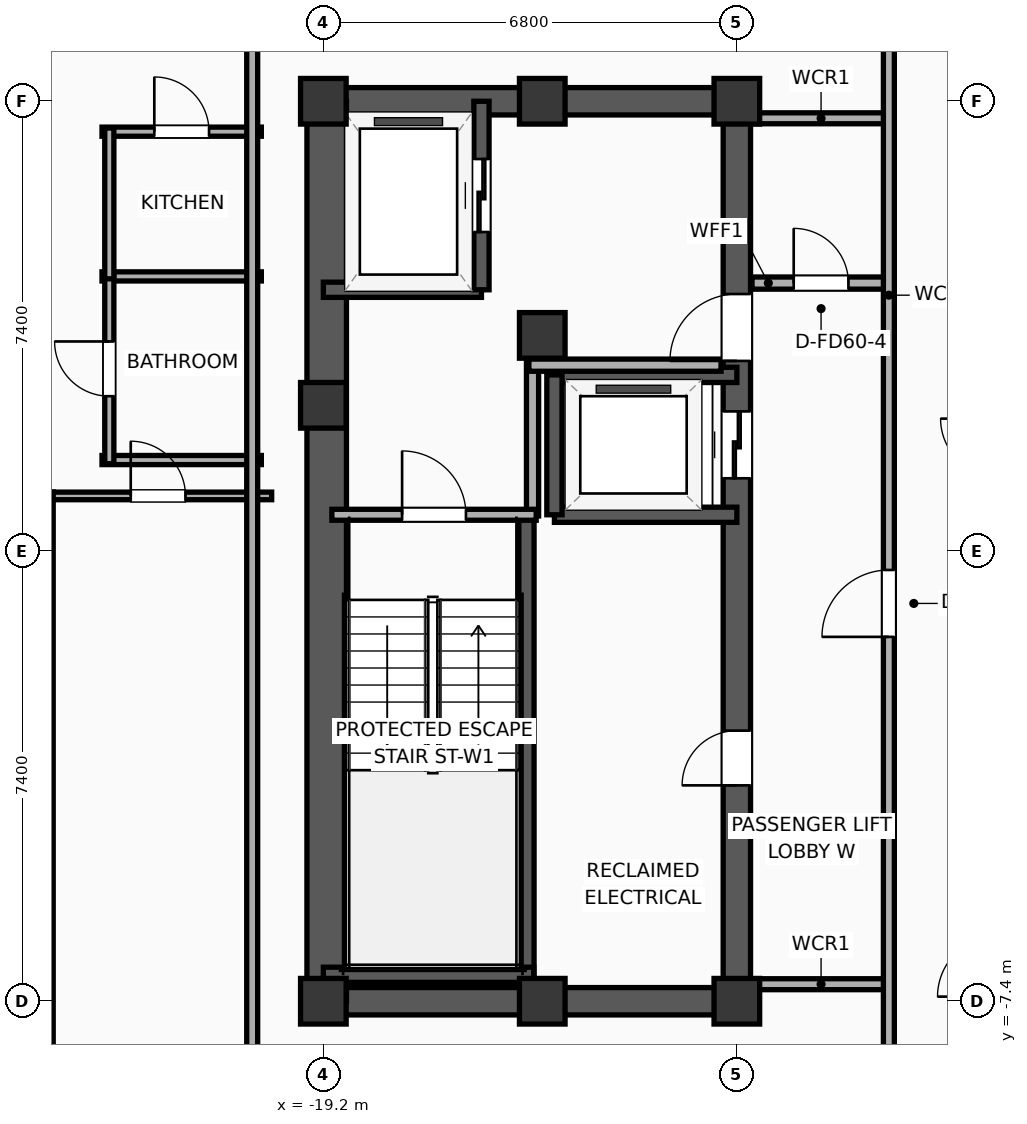
"""IFC4 building model, lengths in metres.
Left out: names, types, materials, properties, quantities, classifications, styles, units other than length and angle.
Written with IfcOpenShell. Run it as: python <this file> out.ifc"""

import sys

from ifc_helpers import new_model, si_unit, direction, frame, frame_2d, origin, origin_2d, place, context, subcontext, project, spatial, rectangle, extrude, element, fill, save


model = new_model("IFC4")
c1 = context("Model", 3, precision=1e-05, world=origin(), true_north=direction((0.0, 1.0)))
c2 = subcontext(c1, "Body", "Model", "MODEL_VIEW")
j1 = project(units=[si_unit("LENGTHUNIT", "METRE"), si_unit("PLANEANGLEUNIT", "RADIAN")], contexts=[c1])
p1 = place(None, origin())
s1 = spatial("IfcSite", under=j1, at=p1, CompositionType="ELEMENT")
p2 = place(p1, origin())
s2 = spatial("IfcBuilding", under=s1, at=p2, CompositionType="ELEMENT")
p3 = place(p2, frame((0.0, 0.0, 260.0)))
s3 = spatial("IfcBuildingStorey", under=s2, at=p3, CompositionType="ELEMENT", Elevation=260.0)
for number, where, z_axis, x_axis in (
    (1, (-19.2, -7.4, 0.0), (0.0, 0.0, 1.0), (1.0, 0.0, 0.0)),
    (2, (-19.2, 2.4, 0.0), (0.0, 0.0, 1.0), (1.0, 0.0, 0.0)),
    (3, (-19.2, 7.4, 0.0), (0.0, 0.0, 1.0), (1.0, 0.0, 0.0)),
    (4, (-15.6, -7.4, 0.0), (0.0, 0.0, 1.0), (1.0, 0.0, 0.0)),
    (5, (-15.6, 7.4, 0.0), (0.0, 0.0, 1.0), (1.0, 0.0, 0.0)),
    (6, (-12.4, -7.4, 0.0), (0.0, 0.0, 1.0), (1.0, 0.0, 0.0)),
    (7, (-15.6, 3.55, 0.0), (0.0, 0.0, 1.0), (1.0, 0.0, 0.0)),
    (8, (-12.4, 7.4, 0.0), (0.0, 0.0, 1.0), (1.0, 0.0, 0.0)),
):
    element("IfcColumn", number, at=place(p3, frame(where, z_axis=z_axis, x_axis=x_axis)), inside=s3, PredefinedType="COLUMN", context=c2, shape_type="SweptSolid", body=[
        extrude(rectangle(XDim=0.75, YDim=0.75, at=origin_2d()), origin(), (0.0, 0.0, 1.0), 3.9),
    ])
for number, where, z_axis, x_axis in (
    (9, (-19.425, -7.4, 0.0), (0.0, 0.0, 1.0), (1.0, 0.0, 0.0)),
    (10, (-19.425, 7.4, 0.0), (0.0, 0.0, 1.0), (1.0, 0.0, 0.0)),
):
    element("IfcWall", number, at=place(p3, frame(where, z_axis=z_axis, x_axis=x_axis)), inside=s3, PredefinedType="SHEAR", context=c2, shape_type="SweptSolid", body=[
        extrude(rectangle(XDim=7.25, YDim=0.45, at=frame_2d((3.625, 0.0))), origin(), (0.0, 0.0, 1.0), 3.65),
    ])
p4 = place(p3, frame((-19.145, -7.4, 0.0), z_axis=(0.0, 0.0, 1.0), x_axis=(0.0, 1.0, 0.0)))
e11 = element("IfcWall", 11, at=p4, inside=s3, PredefinedType="SHEAR", context=c2, shape_type="SweptSolid", body=[
    extrude(rectangle(XDim=14.8, YDim=0.65, at=frame_2d((7.4, 0.0))), origin(), (0.0, 0.0, 1.0), 3.65),
])
p5 = place(p3, frame((-12.4, -7.4, 0.0), z_axis=(0.0, 0.0, 1.0), x_axis=(0.0, 1.0, 0.0)))
e12 = element("IfcWall", 12, at=p5, inside=s3, PredefinedType="SHEAR", context=c2, shape_type="SweptSolid", body=[
    extrude(rectangle(XDim=14.8, YDim=0.45, at=frame_2d((7.4, 0.0))), origin(), (0.0, 0.0, 1.0), 3.65),
])
p6 = place(p5, frame((8.6, 0.0, 0.0)))
e13 = element("IfcOpeningElement", 13, at=p6, cuts=e12, PredefinedType="OPENING", context=c2, shape_type="SweptSolid", body=[
    extrude(rectangle(XDim=1.1, YDim=2.05, at=frame_2d((0.55, 1.025))), frame((0.0, 0.235, 0.0), z_axis=(0.0, -1.0, 0.0), x_axis=(1.0, 0.0, 0.0)), (0.0, 0.0, 1.0), 0.47),
])
p7 = place(p5, frame((10.53, 0.0, 0.0)))
e14 = element("IfcOpeningElement", 14, at=p7, cuts=e12, PredefinedType="OPENING", context=c2, shape_type="SweptSolid", body=[
    extrude(rectangle(XDim=1.1, YDim=2.05, at=frame_2d((0.55, 1.025))), frame((0.0, 0.235, 0.0), z_axis=(0.0, -1.0, 0.0), x_axis=(1.0, 0.0, 0.0)), (0.0, 0.0, 1.0), 0.47),
])
p8 = place(p5, frame((3.55, 0.0, 0.0)))
e15 = element("IfcOpeningElement", 15, at=p8, cuts=e12, PredefinedType="OPENING", context=c2, shape_type="SweptSolid", body=[
    extrude(rectangle(XDim=0.9, YDim=2.05, at=frame_2d((0.45, 1.025))), frame((0.0, 0.235, 0.0), z_axis=(0.0, -1.0, 0.0), x_axis=(1.0, 0.0, 0.0)), (0.0, 0.0, 1.0), 0.47),
])
p9 = place(p3, frame((-15.86, -7.085, 0.0), z_axis=(0.0, 0.0, 1.0), x_axis=(0.0, 1.0, 0.0)))
e16 = element("IfcWall", 16, at=p9, inside=s3, PredefinedType="SOLIDWALL", context=c2, shape_type="SweptSolid", body=[
    extrude(rectangle(XDim=7.685, YDim=0.25, at=frame_2d((3.843, 0.0))), origin(), (0.0, 0.0, 1.0), 3.65),
])
p10 = place(p3, frame((-19.2, -6.965, 0.0), z_axis=(0.0, 0.0, 1.0), x_axis=(1.0, 0.0, 0.0)))
e17 = element("IfcWall", 17, at=p10, inside=s3, PredefinedType="SOLIDWALL", context=c2, shape_type="SweptSolid", body=[
    extrude(rectangle(XDim=3.46, YDim=0.25, at=frame_2d((1.73, 0.0))), origin(), (0.0, 0.0, 1.0), 3.65),
])
p11 = place(p3, frame((-19.2, 4.3, 0.0), z_axis=(0.0, 0.0, 1.0), x_axis=(1.0, 0.0, 0.0)))
e18 = element("IfcWall", 18, at=p11, inside=s3, PredefinedType="SOLIDWALL", context=c2, shape_type="SweptSolid", body=[
    extrude(rectangle(XDim=2.6, YDim=0.25, at=frame_2d((1.3, 0.0))), origin(), (0.0, 0.0, 1.0), 3.65),
])
p12 = place(p3, frame((-16.6, 4.3, 0.0), z_axis=(0.0, 0.0, 1.0), x_axis=(0.0, 1.0, 0.0)))
e19 = element("IfcWall", 19, at=p12, inside=s3, PredefinedType="SOLIDWALL", context=c2, shape_type="SweptSolid", body=[
    extrude(rectangle(XDim=3.1, YDim=0.25, at=frame_2d((1.55, 0.0))), origin(), (0.0, 0.0, 1.0), 3.65),
])
p13 = place(p12, frame((0.95, 0.0, 0.0)))
e20 = element("IfcOpeningElement", 20, at=p13, cuts=e19, PredefinedType="OPENING", context=c2, shape_type="SweptSolid", body=[
    extrude(rectangle(XDim=1.2, YDim=2.05, at=frame_2d((0.6, 1.025))), frame((0.0, 0.135, 0.0), z_axis=(0.0, -1.0, 0.0), x_axis=(1.0, 0.0, 0.0)), (0.0, 0.0, 1.0), 0.27),
])
for number, where, z_axis, x_axis in (
    (21, (-15.4, 0.6, 0.0), (0.0, 0.0, 1.0), (1.0, 0.0, 0.0)),
    (22, (-12.4, 2.9, 0.0), (0.0, 0.0, 1.0), (-1.0, 0.0, 0.0)),
):
    element("IfcWall", number, at=place(p3, frame(where, z_axis=z_axis, x_axis=x_axis)), inside=s3, PredefinedType="SOLIDWALL", context=c2, shape_type="SweptSolid", body=[
        extrude(rectangle(XDim=3.0, YDim=0.25, at=frame_2d((1.5, 0.0))), origin(), (0.0, 0.0, 1.0), 3.65),
    ])
p14 = place(p3, frame((-15.4, 2.9, 0.0), z_axis=(0.0, 0.0, 1.0), x_axis=(0.0, -1.0, 0.0)))
e23 = element("IfcWall", 23, at=p14, inside=s3, PredefinedType="SOLIDWALL", context=c2, shape_type="SweptSolid", body=[
    extrude(rectangle(XDim=2.3, YDim=0.25, at=frame_2d((1.15, 0.0))), origin(), (0.0, 0.0, 1.0), 3.65),
])
p15 = place(p3, frame((-15.76, 0.58, 0.0), z_axis=(0.0, 0.0, 1.0), x_axis=(0.0, 1.0, 0.0)))
e24 = element("IfcWall", 24, at=p15, inside=s3, PredefinedType="PARTITIONING", context=c2, shape_type="SweptSolid", body=[
    extrude(rectangle(XDim=2.52, YDim=0.2, at=frame_2d((1.26, 0.0))), origin(), (0.0, 0.0, 1.0), 3.65),
])
p16 = place(p3, frame((-15.82, 3.06, 0.0), z_axis=(0.0, 0.0, 1.0), x_axis=(1.0, 0.0, 0.0)))
e25 = element("IfcWall", 25, at=p16, inside=s3, PredefinedType="PARTITIONING", context=c2, shape_type="SweptSolid", body=[
    extrude(rectangle(XDim=3.16, YDim=0.2, at=frame_2d((1.58, 0.0))), origin(), (0.0, 0.0, 1.0), 3.65),
])
p17 = place(p3, frame((-19.06, 0.6, 0.0), z_axis=(0.0, 0.0, 1.0), x_axis=(1.0, 0.0, 0.0)))
e26 = element("IfcWall", 26, at=p17, inside=s3, PredefinedType="PARTITIONING", context=c2, shape_type="SweptSolid", body=[
    extrude(rectangle(XDim=3.36, YDim=0.18, at=frame_2d((1.68, 0.0))), origin(), (0.0, 0.0, 1.0), 3.65),
])
p18 = place(p17, frame((1.155, 0.0, 0.0)))
e27 = element("IfcOpeningElement", 27, at=p18, cuts=e26, PredefinedType="OPENING", context=c2, shape_type="SweptSolid", body=[
    extrude(rectangle(XDim=1.05, YDim=2.05, at=frame_2d((0.525, 1.025))), frame((0.0, 0.1, 0.0), z_axis=(0.0, -1.0, 0.0), x_axis=(1.0, 0.0, 0.0)), (0.0, 0.0, 1.0), 0.2),
])
p19 = place(p3, frame((-12.15, 4.41, 0.0), z_axis=(0.0, 0.0, 1.0), x_axis=(1.0, 0.0, 0.0)))
e28 = element("IfcWall", 28, at=p19, inside=s3, PredefinedType="PARTITIONING", context=c2, shape_type="SweptSolid", body=[
    extrude(rectangle(XDim=2.27, YDim=0.2, at=frame_2d((1.135, 0.0))), origin(), (0.0, 0.0, 1.0), 3.65),
])
p20 = place(p19, frame((0.685, 0.0, 0.0)))
e29 = element("IfcOpeningElement", 29, at=p20, cuts=e28, PredefinedType="OPENING", context=c2, shape_type="SweptSolid", body=[
    extrude(rectangle(XDim=0.9, YDim=2.05, at=frame_2d((0.45, 1.025))), frame((0.0, 0.11, 0.0), z_axis=(0.0, -1.0, 0.0), x_axis=(1.0, 0.0, 0.0)), (0.0, 0.0, 1.0), 0.22),
])
for number, where, z_axis, x_axis in (
    (30, (-12.15, 7.12, 0.0), (0.0, 0.0, 1.0), (1.0, 0.0, 0.0)),
    (31, (-12.15, -7.12, 0.0), (0.0, 0.0, 1.0), (1.0, 0.0, 0.0)),
):
    element("IfcWall", number, at=place(p3, frame(where, z_axis=z_axis, x_axis=x_axis)), inside=s3, PredefinedType="PARTITIONING", context=c2, shape_type="SweptSolid", body=[
        extrude(rectangle(XDim=2.27, YDim=0.18, at=frame_2d((1.135, 0.0))), origin(), (0.0, 0.0, 1.0), 3.65),
    ])
p21 = place(p3, frame((-9.9, -8.58, 0.0), z_axis=(0.0, 0.0, 1.0), x_axis=(0.0, 1.0, 0.0)))
e32 = element("IfcWall", 32, at=p21, inside=s3, PredefinedType="PARTITIONING", context=c2, shape_type="SweptSolid", body=[
    extrude(rectangle(XDim=17.16, YDim=0.18, at=frame_2d((8.58, 0.0))), origin(), (0.0, 0.0, 1.0), 3.65),
])
p22 = place(p21, frame((7.172, 0.0, 0.0)))
e33 = element("IfcOpeningElement", 33, at=p22, cuts=e32, PredefinedType="OPENING", context=c2, shape_type="SweptSolid", body=[
    extrude(rectangle(XDim=1.1, YDim=2.05, at=frame_2d((0.55, 1.025))), frame((0.0, 0.1, 0.0), z_axis=(0.0, -1.0, 0.0), x_axis=(1.0, 0.0, 0.0)), (0.0, 0.0, 1.0), 0.2),
])
p23 = place(p3, frame((-22.84, 6.9, 0.0), z_axis=(0.0, 0.0, 1.0), x_axis=(1.0, 0.0, 0.0)))
e34 = element("IfcWall", 34, at=p23, inside=s3, PredefinedType="PLUMBINGWALL", context=c2, shape_type="SweptSolid", body=[
    extrude(rectangle(XDim=2.62, YDim=0.15, at=frame_2d((1.31, 0.0))), origin(), (0.0, 0.0, 1.0), 3.65),
])
p24 = place(p23, frame((0.86, 0.0, 0.0)))
e35 = element("IfcOpeningElement", 35, at=p24, cuts=e34, PredefinedType="OPENING", context=c2, shape_type="SweptSolid", body=[
    extrude(rectangle(XDim=0.9, YDim=2.05, at=frame_2d((0.45, 1.025))), frame((0.0, 0.085, 0.0), z_axis=(0.0, -1.0, 0.0), x_axis=(1.0, 0.0, 0.0)), (0.0, 0.0, 1.0), 0.17),
])
for number, where, z_axis, x_axis in (
    (36, (-22.84, 4.52, 0.0), (0.0, 0.0, 1.0), (1.0, 0.0, 0.0)),
    (37, (-22.84, 1.5, 0.0), (0.0, 0.0, 1.0), (1.0, 0.0, 0.0)),
):
    element("IfcWall", number, at=place(p3, frame(where, z_axis=z_axis, x_axis=x_axis)), inside=s3, PredefinedType="PLUMBINGWALL", context=c2, shape_type="SweptSolid", body=[
        extrude(rectangle(XDim=2.62, YDim=0.15, at=frame_2d((1.31, 0.0))), origin(), (0.0, 0.0, 1.0), 3.65),
    ])
p25 = place(p3, frame((-22.72, 1.44, 0.0), z_axis=(0.0, 0.0, 1.0), x_axis=(0.0, 1.0, 0.0)))
e38 = element("IfcWall", 38, at=p25, inside=s3, PredefinedType="PLUMBINGWALL", context=c2, shape_type="SweptSolid", body=[
    extrude(rectangle(XDim=3.12, YDim=0.15, at=frame_2d((1.56, 0.0))), origin(), (0.0, 0.0, 1.0), 3.65),
])
p26 = place(p25, frame((1.11, 0.0, 0.0)))
e39 = element("IfcOpeningElement", 39, at=p26, cuts=e38, PredefinedType="OPENING", context=c2, shape_type="SweptSolid", body=[
    extrude(rectangle(XDim=0.9, YDim=2.05, at=frame_2d((0.45, 1.025))), frame((0.0, 0.085, 0.0), z_axis=(0.0, -1.0, 0.0), x_axis=(1.0, 0.0, 0.0)), (0.0, 0.0, 1.0), 0.17),
])
p27 = place(p3, frame((-22.72, 4.48, 0.0), z_axis=(0.0, 0.0, 1.0), x_axis=(0.0, 1.0, 0.0)))
e40 = element("IfcWall", 40, at=p27, inside=s3, PredefinedType="PLUMBINGWALL", context=c2, shape_type="SweptSolid", body=[
    extrude(rectangle(XDim=2.48, YDim=0.15, at=frame_2d((1.24, 0.0))), origin(), (0.0, 0.0, 1.0), 3.65),
])
p28 = place(p3, frame((-27.104, 0.91, 0.0), z_axis=(0.0, 0.0, 1.0), x_axis=(1.0, 0.0, 0.0)))
e41 = element("IfcWall", 41, at=p28, inside=s3, PredefinedType="PARTITIONING", context=c2, shape_type="SweptSolid", body=[
    extrude(rectangle(XDim=3.461, YDim=0.125, at=frame_2d((1.73, 0.0))), origin(), (0.0, 0.0, 1.0), 3.65),
])
p29 = place(p28, frame((1.281, 0.0, 0.0)))
e42 = element("IfcOpeningElement", 42, at=p29, cuts=e41, PredefinedType="OPENING", context=c2, shape_type="SweptSolid", body=[
    extrude(rectangle(XDim=0.9, YDim=2.05, at=frame_2d((0.45, 1.025))), frame((0.0, 0.073, 0.0), z_axis=(0.0, -1.0, 0.0), x_axis=(1.0, 0.0, 0.0)), (0.0, 0.0, 1.0), 0.145),
])
p30 = place(p3, frame((-23.768, 0.91, 0.0), z_axis=(0.0, 0.0, 1.0), x_axis=(1.0, 0.0, 0.0)))
e43 = element("IfcWall", 43, at=p30, inside=s3, PredefinedType="PARTITIONING", context=c2, shape_type="SweptSolid", body=[
    extrude(rectangle(XDim=3.718, YDim=0.125, at=frame_2d((1.859, 0.0))), origin(), (0.0, 0.0, 1.0), 3.65),
])
p31 = place(p30, frame((1.4, 0.0, 0.0)))
e44 = element("IfcOpeningElement", 44, at=p31, cuts=e43, PredefinedType="OPENING", context=c2, shape_type="SweptSolid", body=[
    extrude(rectangle(XDim=0.9, YDim=2.05, at=frame_2d((0.45, 1.025))), frame((0.0, 0.073, 0.0), z_axis=(0.0, -1.0, 0.0), x_axis=(1.0, 0.0, 0.0)), (0.0, 0.0, 1.0), 0.145),
])
p32 = place(p3, frame((-23.705, -8.81, 0.0), z_axis=(0.0, 0.0, 1.0), x_axis=(0.0, 1.0, 0.0)))
e45 = element("IfcWall", 45, at=p32, inside=s3, PredefinedType="PARTITIONING", context=c2, shape_type="SweptSolid", body=[
    extrude(rectangle(XDim=9.78, YDim=0.125, at=frame_2d((4.89, 0.0))), origin(), (0.0, 0.0, 1.0), 3.65),
])
p33 = place(p3, frame((-20.37, -8.61, 0.0), z_axis=(0.0, 0.0, 1.0), x_axis=(0.0, 1.0, 0.0)))
e46 = element("IfcWall", 46, at=p33, inside=s3, PredefinedType="PARTITIONING", context=c2, shape_type="SweptSolid", body=[
    extrude(rectangle(XDim=17.22, YDim=0.18, at=frame_2d((8.61, 0.0))), origin(), (0.0, 0.0, 1.0), 3.65),
])
p34 = place(p13, origin())
e47 = element("IfcDoor", 47, at=p34, inside=s3, OperationType="SLIDING_TO_LEFT", PredefinedType="DOOR", context=c2, shape_type="SweptSolid", body=[
    extrude(rectangle(XDim=1.2, YDim=2.05, at=frame_2d((0.6, 1.025))), frame((0.0, 0.025, 0.0), z_axis=(0.0, -1.0, 0.0), x_axis=(1.0, 0.0, 0.0)), (0.0, 0.0, 1.0), 0.05),
])
fill(e20, e47)
p35 = place(p6, origin())
e48 = element("IfcDoor", 48, at=p35, inside=s3, OperationType="SLIDING_TO_LEFT", PredefinedType="DOOR", context=c2, shape_type="SweptSolid", body=[
    extrude(rectangle(XDim=1.1, YDim=2.05, at=frame_2d((0.55, 1.025))), frame((0.0, 0.025, 0.0), z_axis=(0.0, -1.0, 0.0), x_axis=(1.0, 0.0, 0.0)), (0.0, 0.0, 1.0), 0.05),
])
fill(e13, e48)
p36 = place(p18, origin())
e49 = element("IfcDoor", 49, at=p36, inside=s3, OperationType="SINGLE_SWING_LEFT", PredefinedType="DOOR", context=c2, shape_type="SweptSolid", body=[
    extrude(rectangle(XDim=1.05, YDim=2.05, at=frame_2d((0.525, 1.025))), frame((0.0, 0.025, 0.0), z_axis=(0.0, -1.0, 0.0), x_axis=(1.0, 0.0, 0.0)), (0.0, 0.0, 1.0), 0.05),
])
fill(e27, e49)
p37 = place(p20, origin())
e50 = element("IfcDoor", 50, at=p37, inside=s3, OperationType="SINGLE_SWING_LEFT", PredefinedType="DOOR", context=c2, shape_type="SweptSolid", body=[
    extrude(rectangle(XDim=0.9, YDim=2.05, at=frame_2d((0.45, 1.025))), frame((0.0, 0.025, 0.0), z_axis=(0.0, -1.0, 0.0), x_axis=(1.0, 0.0, 0.0)), (0.0, 0.0, 1.0), 0.05),
])
fill(e29, e50)
p38 = place(p22, origin())
e51 = element("IfcDoor", 51, at=p38, inside=s3, OperationType="SINGLE_SWING_LEFT", PredefinedType="DOOR", context=c2, shape_type="SweptSolid", body=[
    extrude(rectangle(XDim=1.1, YDim=2.05, at=frame_2d((0.55, 1.025))), frame((0.0, 0.025, 0.0), z_axis=(0.0, -1.0, 0.0), x_axis=(1.0, 0.0, 0.0)), (0.0, 0.0, 1.0), 0.05),
])
fill(e33, e51)
p39 = place(p24, origin())
e52 = element("IfcDoor", 52, at=p39, inside=s3, OperationType="SINGLE_SWING_LEFT", PredefinedType="DOOR", context=c2, shape_type="SweptSolid", body=[
    extrude(rectangle(XDim=0.9, YDim=2.05, at=frame_2d((0.45, 1.025))), frame((0.0, 0.025, 0.0), z_axis=(0.0, -1.0, 0.0), x_axis=(1.0, 0.0, 0.0)), (0.0, 0.0, 1.0), 0.05),
])
fill(e35, e52)
p40 = place(p26, origin())
e53 = element("IfcDoor", 53, at=p40, inside=s3, OperationType="SINGLE_SWING_RIGHT", PredefinedType="DOOR", context=c2, shape_type="SweptSolid", body=[
    extrude(rectangle(XDim=0.9, YDim=2.05, at=frame_2d((0.45, 1.025))), frame((0.0, 0.025, 0.0), z_axis=(0.0, -1.0, 0.0), x_axis=(1.0, 0.0, 0.0)), (0.0, 0.0, 1.0), 0.05),
])
fill(e39, e53)
p41 = place(p31, origin())
e54 = element("IfcDoor", 54, at=p41, inside=s3, OperationType="SINGLE_SWING_LEFT", PredefinedType="DOOR", context=c2, shape_type="SweptSolid", body=[
    extrude(rectangle(XDim=0.9, YDim=2.05, at=frame_2d((0.45, 1.025))), frame((0.0, 0.025, 0.0), z_axis=(0.0, -1.0, 0.0), x_axis=(1.0, 0.0, 0.0)), (0.0, 0.0, 1.0), 0.05),
])
fill(e44, e54)
p42 = place(p7, origin())
e55 = element("IfcDoor", 55, at=p42, inside=s3, OperationType="SINGLE_SWING_LEFT", PredefinedType="DOOR", context=c2, shape_type="SweptSolid", body=[
    extrude(rectangle(XDim=1.1, YDim=2.05, at=frame_2d((0.55, 1.025))), frame((0.0, 0.025, 0.0), z_axis=(0.0, -1.0, 0.0), x_axis=(1.0, 0.0, 0.0)), (0.0, 0.0, 1.0), 0.05),
])
fill(e14, e55)
p43 = place(p8, origin())
e56 = element("IfcDoor", 56, at=p43, inside=s3, OperationType="SINGLE_SWING_LEFT", PredefinedType="DOOR", context=c2, shape_type="SweptSolid", body=[
    extrude(rectangle(XDim=0.9, YDim=2.05, at=frame_2d((0.45, 1.025))), frame((0.0, 0.025, 0.0), z_axis=(0.0, -1.0, 0.0), x_axis=(1.0, 0.0, 0.0)), (0.0, 0.0, 1.0), 0.05),
])
fill(e15, e56)
save(model, sys.argv[1])
